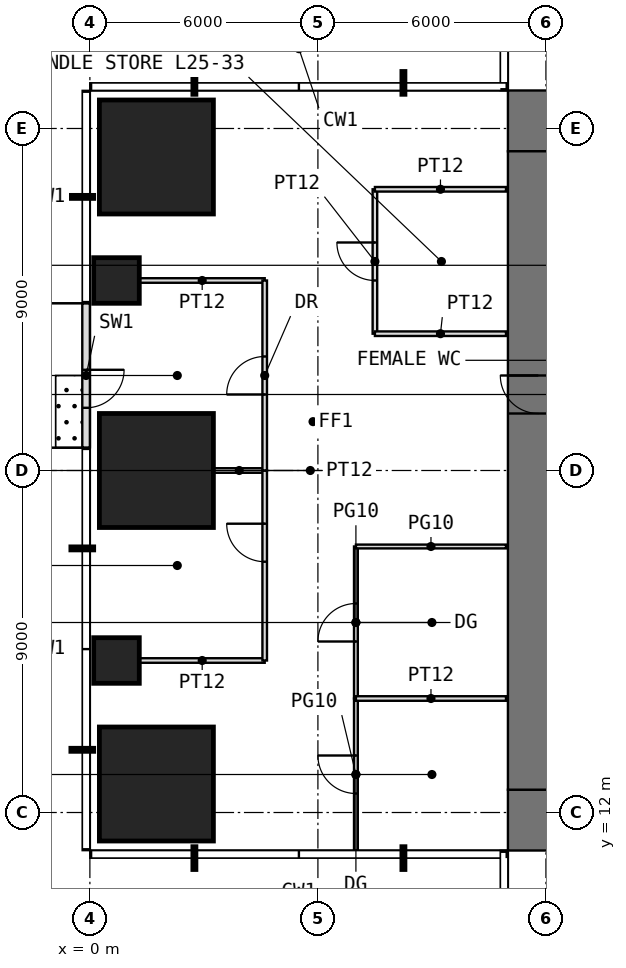
"""IFC4 building model, lengths in metres.
Left out: names, types, materials, properties, quantities, classifications, styles, units other than length and angle.
Written with IfcOpenShell. Run it as: python <this file> out.ifc"""

import sys

from ifc_helpers import new_model, si_unit, direction, frame, frame_2d, origin, origin_2d, place, context, subcontext, project, spatial, rectangle, extrude, element, fill, save


model = new_model("IFC4")
c1 = context("Model", 3, precision=1e-05, world=origin(), true_north=direction((0.0, 1.0)))
c2 = subcontext(c1, "Body", "Model", "MODEL_VIEW")
j1 = project(units=[si_unit("LENGTHUNIT", "METRE"), si_unit("PLANEANGLEUNIT", "RADIAN")], contexts=[c1])
p1 = place(None, origin())
s1 = spatial("IfcSite", under=j1, at=p1, CompositionType="ELEMENT")
p2 = place(p1, origin())
s2 = spatial("IfcBuilding", under=s1, at=p2, CompositionType="ELEMENT")
p3 = place(p2, frame((0.0, 0.0, 108.5)))
s3 = spatial("IfcBuildingStorey", under=s2, at=p3, CompositionType="ELEMENT", Elevation=108.5)
p4 = place(p3, frame((1.75, 12.75, 0.0), z_axis=(0.0, 0.0, 1.0), x_axis=(1.0, 0.0, 0.0)))
e1 = element("IfcColumn", 1, at=p4, inside=s3, PredefinedType="COLUMN", context=c2, shape_type="SweptSolid", body=[
    extrude(rectangle(XDim=3.0, YDim=3.0, at=origin_2d()), origin(), (0.0, 0.0, 1.0), 4.0),
])
p5 = place(p3, frame((0.7, 16.0, 0.0), z_axis=(0.0, 0.0, 1.0), x_axis=(1.0, 0.0, 0.0)))
e2 = element("IfcColumn", 2, at=p5, inside=s3, PredefinedType="COLUMN", context=c2, shape_type="SweptSolid", body=[
    extrude(rectangle(XDim=1.2, YDim=1.2, at=origin_2d()), origin(), (0.0, 0.0, 1.0), 4.0),
])
p6 = place(p3, frame((1.75, 21.0, 0.0), z_axis=(0.0, 0.0, 1.0), x_axis=(1.0, 0.0, 0.0)))
e3 = element("IfcColumn", 3, at=p6, inside=s3, PredefinedType="COLUMN", context=c2, shape_type="SweptSolid", body=[
    extrude(rectangle(XDim=3.0, YDim=3.0, at=origin_2d()), origin(), (0.0, 0.0, 1.0), 4.0),
])
p7 = place(p3, frame((0.7, 26.0, 0.0), z_axis=(0.0, 0.0, 1.0), x_axis=(1.0, 0.0, 0.0)))
e4 = element("IfcColumn", 4, at=p7, inside=s3, PredefinedType="COLUMN", context=c2, shape_type="SweptSolid", body=[
    extrude(rectangle(XDim=1.2, YDim=1.2, at=origin_2d()), origin(), (0.0, 0.0, 1.0), 4.0),
])
p8 = place(p3, frame((1.75, 29.25, 0.0), z_axis=(0.0, 0.0, 1.0), x_axis=(1.0, 0.0, 0.0)))
e5 = element("IfcColumn", 5, at=p8, inside=s3, PredefinedType="COLUMN", context=c2, shape_type="SweptSolid", body=[
    extrude(rectangle(XDim=3.0, YDim=3.0, at=origin_2d()), origin(), (0.0, 0.0, 1.0), 4.0),
])
p9 = place(p3, frame((-0.1, 25.4, 0.0), z_axis=(0.0, 0.0, 1.0), x_axis=(0.0, -1.0, 0.0)))
e6 = element("IfcWall", 6, at=p9, inside=s3, PredefinedType="USERDEFINED", context=c2, shape_type="SweptSolid", body=[
    extrude(rectangle(XDim=3.8, YDim=0.2, at=frame_2d((1.9, 0.0))), origin(), (0.0, 0.0, 1.0), 3.75),
])
p10 = place(p9, frame((1.75, 0.0, 0.0)))
e7 = element("IfcOpeningElement", 7, at=p10, cuts=e6, PredefinedType="OPENING", context=c2, shape_type="SweptSolid", body=[
    extrude(rectangle(XDim=1.0, YDim=2.4, at=frame_2d((0.5, 1.2))), frame((0.0, 0.11, 0.0), z_axis=(0.0, -1.0, 0.0), x_axis=(1.0, 0.0, 0.0)), (0.0, 0.0, 1.0), 0.22),
])
p11 = place(p3, frame((11.0, 11.8, -0.05), z_axis=(0.0, 0.0, 1.0), x_axis=(1.0, 0.0, 0.0)))
e8 = element("IfcWall", 8, at=p11, inside=s3, PredefinedType="SHEAR", context=c2, shape_type="SweptSolid", body=[
    extrude(rectangle(XDim=20.0, YDim=1.6, at=frame_2d((10.0, 0.0))), origin(), (0.0, 0.0, 1.0), 4.0),
])
p12 = place(p11, frame((9.0, 0.0, 0.05)))
e9 = element("IfcOpeningElement", 9, at=p12, cuts=e8, PredefinedType="OPENING", context=c2, shape_type="SweptSolid", body=[
    extrude(rectangle(XDim=2.0, YDim=2.2, at=frame_2d((1.0, 1.1))), frame((0.0, 0.81, 0.0), z_axis=(0.0, -1.0, 0.0), x_axis=(1.0, 0.0, 0.0)), (0.0, 0.0, 1.0), 1.62),
])
p13 = place(p3, frame((11.0, 30.2, -0.05), z_axis=(0.0, 0.0, 1.0), x_axis=(1.0, 0.0, 0.0)))
e10 = element("IfcWall", 10, at=p13, inside=s3, PredefinedType="SHEAR", context=c2, shape_type="SweptSolid", body=[
    extrude(rectangle(XDim=20.0, YDim=1.6, at=frame_2d((10.0, 0.0))), origin(), (0.0, 0.0, 1.0), 4.0),
])
p14 = place(p13, frame((9.0, 0.0, 0.05)))
e11 = element("IfcOpeningElement", 11, at=p14, cuts=e10, PredefinedType="OPENING", context=c2, shape_type="SweptSolid", body=[
    extrude(rectangle(XDim=2.0, YDim=2.2, at=frame_2d((1.0, 1.1))), frame((0.0, 0.81, 0.0), z_axis=(0.0, -1.0, 0.0), x_axis=(1.0, 0.0, 0.0)), (0.0, 0.0, 1.0), 1.62),
])
p15 = place(p3, frame((11.8, 12.6, -0.05), z_axis=(0.0, 0.0, 1.0), x_axis=(0.0, 1.0, 0.0)))
e12 = element("IfcWall", 12, at=p15, inside=s3, PredefinedType="SHEAR", context=c2, shape_type="SweptSolid", body=[
    extrude(rectangle(XDim=16.8, YDim=1.6, at=frame_2d((8.4, 0.0))), origin(), (0.0, 0.0, 1.0), 4.0),
])
p16 = place(p15, frame((9.9, 0.0, 0.05)))
e13 = element("IfcOpeningElement", 13, at=p16, cuts=e12, PredefinedType="OPENING", context=c2, shape_type="SweptSolid", body=[
    extrude(rectangle(XDim=1.0, YDim=2.2, at=frame_2d((0.5, 1.1))), frame((0.0, 0.81, 0.0), z_axis=(0.0, -1.0, 0.0), x_axis=(1.0, 0.0, 0.0)), (0.0, 0.0, 1.0), 1.62),
])
for number, where, z_axis, x_axis in (
    (14, (1.31, 16.0, 0.0), (0.0, 0.0, 1.0), (1.0, 0.0, 0.0)),
    (15, (1.31, 26.0, 0.0), (0.0, 0.0, 1.0), (1.0, 0.0, 0.0)),
):
    element("IfcWall", number, at=place(p3, frame(where, z_axis=z_axis, x_axis=x_axis)), inside=s3, PredefinedType="PARTITIONING", context=c2, shape_type="SweptSolid", body=[
        extrude(rectangle(XDim=3.29, YDim=0.12, at=frame_2d((1.645, 0.0))), origin(), (0.0, 0.0, 1.0), 3.75),
    ])
p17 = place(p3, frame((3.26, 21.0, 0.0), z_axis=(0.0, 0.0, 1.0), x_axis=(1.0, 0.0, 0.0)))
e16 = element("IfcWall", 16, at=p17, inside=s3, PredefinedType="PARTITIONING", context=c2, shape_type="SweptSolid", body=[
    extrude(rectangle(XDim=1.34, YDim=0.12, at=frame_2d((0.67, 0.0))), origin(), (0.0, 0.0, 1.0), 3.75),
])
p18 = place(p3, frame((4.6, 16.0, 0.0), z_axis=(0.0, 0.0, 1.0), x_axis=(0.0, 1.0, 0.0)))
e17 = element("IfcWall", 17, at=p18, inside=s3, PredefinedType="PARTITIONING", context=c2, shape_type="SweptSolid", body=[
    extrude(rectangle(XDim=5.0, YDim=0.12, at=frame_2d((2.5, 0.0))), origin(), (0.0, 0.0, 1.0), 3.75),
])
p19 = place(p18, frame((2.6, 0.0, 0.0)))
e18 = element("IfcOpeningElement", 18, at=p19, cuts=e17, PredefinedType="OPENING", context=c2, shape_type="SweptSolid", body=[
    extrude(rectangle(XDim=1.0, YDim=2.2, at=frame_2d((0.5, 1.1))), frame((0.0, 0.07, 0.0), z_axis=(0.0, -1.0, 0.0), x_axis=(1.0, 0.0, 0.0)), (0.0, 0.0, 1.0), 0.14),
])
p20 = place(p3, frame((4.6, 21.0, 0.0), z_axis=(0.0, 0.0, 1.0), x_axis=(0.0, 1.0, 0.0)))
e19 = element("IfcWall", 19, at=p20, inside=s3, PredefinedType="PARTITIONING", context=c2, shape_type="SweptSolid", body=[
    extrude(rectangle(XDim=5.0, YDim=0.12, at=frame_2d((2.5, 0.0))), origin(), (0.0, 0.0, 1.0), 3.75),
])
p21 = place(p20, frame((2.0, 0.0, 0.0)))
e20 = element("IfcOpeningElement", 20, at=p21, cuts=e19, PredefinedType="OPENING", context=c2, shape_type="SweptSolid", body=[
    extrude(rectangle(XDim=1.0, YDim=2.2, at=frame_2d((0.5, 1.1))), frame((0.0, 0.07, 0.0), z_axis=(0.0, -1.0, 0.0), x_axis=(1.0, 0.0, 0.0)), (0.0, 0.0, 1.0), 0.14),
])
p22 = place(p3, frame((7.0, 11.0, 0.0), z_axis=(0.0, 0.0, 1.0), x_axis=(0.0, 1.0, 0.0)))
e21 = element("IfcWall", 21, at=p22, inside=s3, PredefinedType="PARTITIONING", context=c2, shape_type="SweptSolid", body=[
    extrude(rectangle(XDim=4.0, YDim=0.1, at=frame_2d((2.0, 0.0))), origin(), (0.0, 0.0, 1.0), 3.75),
])
p23 = place(p22, frame((1.5, 0.0, 0.0)))
e22 = element("IfcOpeningElement", 22, at=p23, cuts=e21, PredefinedType="OPENING", context=c2, shape_type="SweptSolid", body=[
    extrude(rectangle(XDim=1.0, YDim=2.4, at=frame_2d((0.5, 1.2))), frame((0.0, 0.06, 0.0), z_axis=(0.0, -1.0, 0.0), x_axis=(1.0, 0.0, 0.0)), (0.0, 0.0, 1.0), 0.12),
])
p24 = place(p3, frame((7.0, 15.0, 0.0), z_axis=(0.0, 0.0, 1.0), x_axis=(0.0, 1.0, 0.0)))
e23 = element("IfcWall", 23, at=p24, inside=s3, PredefinedType="PARTITIONING", context=c2, shape_type="SweptSolid", body=[
    extrude(rectangle(XDim=4.0, YDim=0.1, at=frame_2d((2.0, 0.0))), origin(), (0.0, 0.0, 1.0), 3.75),
])
p25 = place(p24, frame((1.5, 0.0, 0.0)))
e24 = element("IfcOpeningElement", 24, at=p25, cuts=e23, PredefinedType="OPENING", context=c2, shape_type="SweptSolid", body=[
    extrude(rectangle(XDim=1.0, YDim=2.4, at=frame_2d((0.5, 1.2))), frame((0.0, 0.06, 0.0), z_axis=(0.0, -1.0, 0.0), x_axis=(1.0, 0.0, 0.0)), (0.0, 0.0, 1.0), 0.12),
])
p26 = place(p3, frame((7.0, 15.0, 0.0), z_axis=(0.0, 0.0, 1.0), x_axis=(1.0, 0.0, 0.0)))
e25 = element("IfcWall", 25, at=p26, inside=s3, PredefinedType="PARTITIONING", context=c2, shape_type="SweptSolid", body=[
    extrude(rectangle(XDim=3.95, YDim=0.12, at=frame_2d((1.975, 0.0))), origin(), (0.0, 0.0, 1.0), 3.75),
])
p27 = place(p3, frame((7.0, 19.0, 0.0), z_axis=(0.0, 0.0, 1.0), x_axis=(1.0, 0.0, 0.0)))
e26 = element("IfcWall", 26, at=p27, inside=s3, PredefinedType="PARTITIONING", context=c2, shape_type="SweptSolid", body=[
    extrude(rectangle(XDim=3.95, YDim=0.1, at=frame_2d((1.975, 0.0))), origin(), (0.0, 0.0, 1.0), 3.75),
])
p28 = place(p3, frame((7.5, 24.6, 0.0), z_axis=(0.0, 0.0, 1.0), x_axis=(0.0, 1.0, 0.0)))
e27 = element("IfcWall", 27, at=p28, inside=s3, PredefinedType="PARTITIONING", context=c2, shape_type="SweptSolid", body=[
    extrude(rectangle(XDim=3.8, YDim=0.12, at=frame_2d((1.9, 0.0))), origin(), (0.0, 0.0, 1.0), 3.75),
])
p29 = place(p28, frame((1.4, 0.0, 0.0)))
e28 = element("IfcOpeningElement", 28, at=p29, cuts=e27, PredefinedType="OPENING", context=c2, shape_type="SweptSolid", body=[
    extrude(rectangle(XDim=1.0, YDim=2.2, at=frame_2d((0.5, 1.1))), frame((0.0, 0.07, 0.0), z_axis=(0.0, -1.0, 0.0), x_axis=(1.0, 0.0, 0.0)), (0.0, 0.0, 1.0), 0.14),
])
for number, where, z_axis, x_axis in (
    (29, (7.5, 24.6, 0.0), (0.0, 0.0, 1.0), (1.0, 0.0, 0.0)),
    (30, (7.5, 28.4, 0.0), (0.0, 0.0, 1.0), (1.0, 0.0, 0.0)),
):
    element("IfcWall", number, at=place(p3, frame(where, z_axis=z_axis, x_axis=x_axis)), inside=s3, PredefinedType="PARTITIONING", context=c2, shape_type="SweptSolid", body=[
        extrude(rectangle(XDim=3.45, YDim=0.12, at=frame_2d((1.725, 0.0))), origin(), (0.0, 0.0, 1.0), 3.75),
    ])
p30 = place(p10, origin())
e31 = element("IfcDoor", 31, at=p30, inside=s3, OperationType="SINGLE_SWING_LEFT", PredefinedType="DOOR", context=c2, shape_type="SweptSolid", body=[
    extrude(rectangle(XDim=1.0, YDim=2.4, at=frame_2d((0.5, 1.2))), frame((0.0, 0.025, 0.0), z_axis=(0.0, -1.0, 0.0), x_axis=(1.0, 0.0, 0.0)), (0.0, 0.0, 1.0), 0.05),
])
fill(e7, e31)
p31 = place(p16, origin())
e32 = element("IfcDoor", 32, at=p31, inside=s3, OperationType="SINGLE_SWING_RIGHT", PredefinedType="DOOR", context=c2, shape_type="SweptSolid", body=[
    extrude(rectangle(XDim=1.0, YDim=2.2, at=frame_2d((0.5, 1.1))), frame((0.0, 0.025, 0.0), z_axis=(0.0, -1.0, 0.0), x_axis=(1.0, 0.0, 0.0)), (0.0, 0.0, 1.0), 0.05),
])
fill(e13, e32)
p32 = place(p23, origin())
e33 = element("IfcDoor", 33, at=p32, inside=s3, OperationType="SINGLE_SWING_RIGHT", PredefinedType="DOOR", context=c2, shape_type="SweptSolid", body=[
    extrude(rectangle(XDim=1.0, YDim=2.4, at=frame_2d((0.5, 1.2))), frame((0.0, 0.025, 0.0), z_axis=(0.0, -1.0, 0.0), x_axis=(1.0, 0.0, 0.0)), (0.0, 0.0, 1.0), 0.05),
])
fill(e22, e33)
p33 = place(p25, origin())
e34 = element("IfcDoor", 34, at=p33, inside=s3, OperationType="SINGLE_SWING_LEFT", PredefinedType="DOOR", context=c2, shape_type="SweptSolid", body=[
    extrude(rectangle(XDim=1.0, YDim=2.4, at=frame_2d((0.5, 1.2))), frame((0.0, 0.025, 0.0), z_axis=(0.0, -1.0, 0.0), x_axis=(1.0, 0.0, 0.0)), (0.0, 0.0, 1.0), 0.05),
])
fill(e24, e34)
p34 = place(p29, origin())
e35 = element("IfcDoor", 35, at=p34, inside=s3, OperationType="SINGLE_SWING_RIGHT", PredefinedType="DOOR", context=c2, shape_type="SweptSolid", body=[
    extrude(rectangle(XDim=1.0, YDim=2.2, at=frame_2d((0.5, 1.1))), frame((0.0, 0.025, 0.0), z_axis=(0.0, -1.0, 0.0), x_axis=(1.0, 0.0, 0.0)), (0.0, 0.0, 1.0), 0.05),
])
fill(e28, e35)
p35 = place(p19, origin())
e36 = element("IfcDoor", 36, at=p35, inside=s3, OperationType="SINGLE_SWING_RIGHT", PredefinedType="DOOR", context=c2, shape_type="SweptSolid", body=[
    extrude(rectangle(XDim=1.0, YDim=2.2, at=frame_2d((0.5, 1.1))), frame((0.0, 0.025, 0.0), z_axis=(0.0, -1.0, 0.0), x_axis=(1.0, 0.0, 0.0)), (0.0, 0.0, 1.0), 0.05),
])
fill(e18, e36)
p36 = place(p21, origin())
e37 = element("IfcDoor", 37, at=p36, inside=s3, OperationType="SINGLE_SWING_LEFT", PredefinedType="DOOR", context=c2, shape_type="SweptSolid", body=[
    extrude(rectangle(XDim=1.0, YDim=2.2, at=frame_2d((0.5, 1.1))), frame((0.0, 0.025, 0.0), z_axis=(0.0, -1.0, 0.0), x_axis=(1.0, 0.0, 0.0)), (0.0, 0.0, 1.0), 0.05),
])
fill(e20, e37)
save(model, sys.argv[1])
